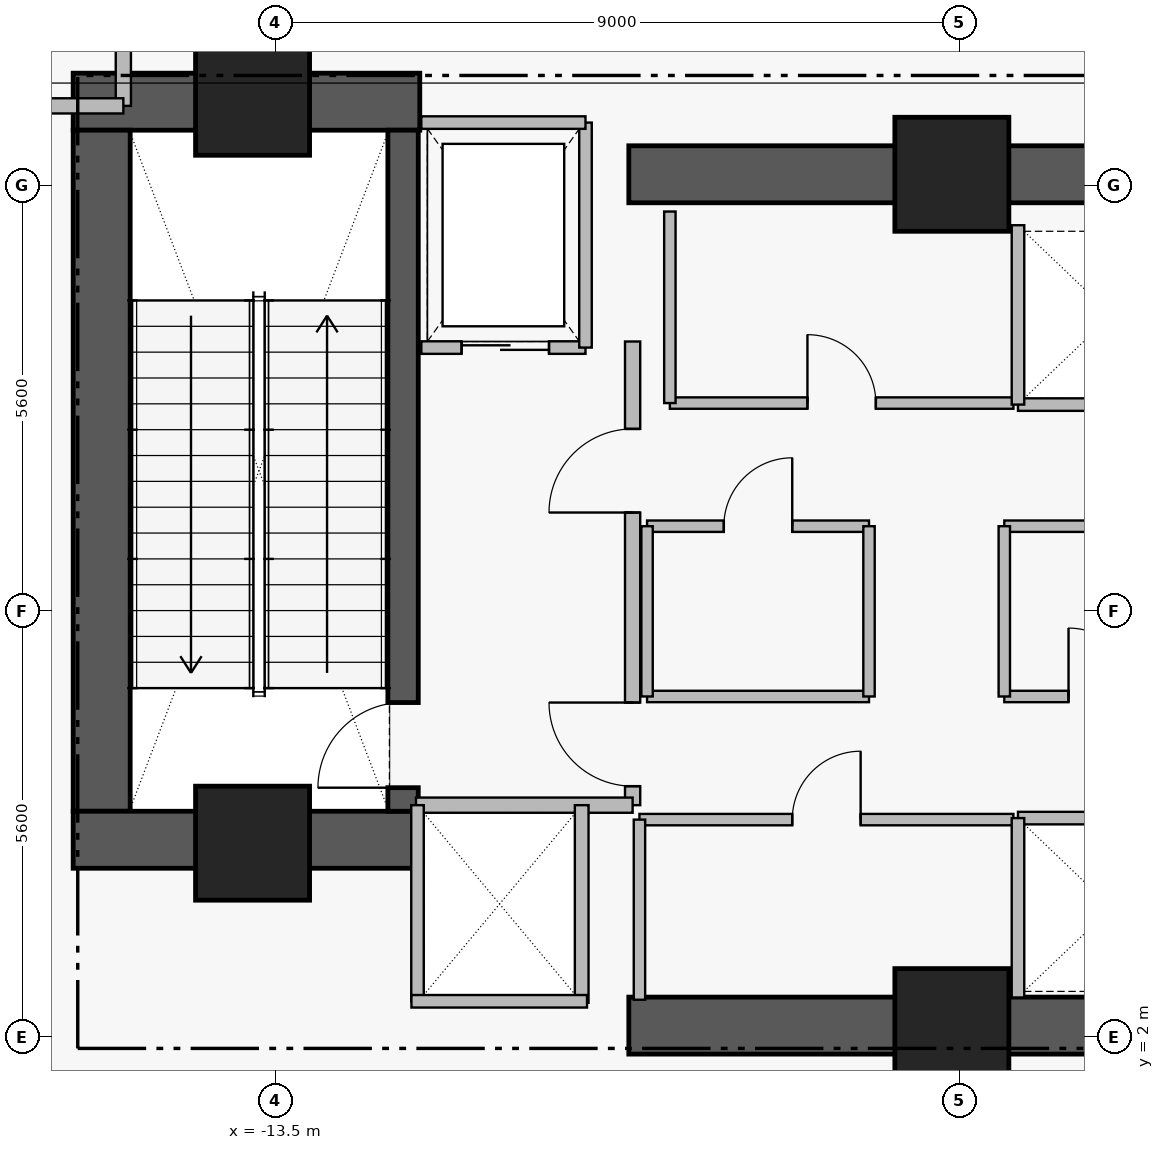
"""IFC4 building model, lengths in metres.
Left out: names, types, materials, properties, quantities, classifications, styles, units other than length and angle.
Written with IfcOpenShell. Run it as: python <this file> out.ifc"""

import sys

from ifc_helpers import new_model, si_unit, direction, frame, frame_2d, origin, origin_2d, place, context, subcontext, project, spatial, rectangle, extrude, element, fill, save


model = new_model("IFC4")
c1 = context("Model", 3, precision=1e-05, world=origin(), true_north=direction((0.0, 1.0)))
c2 = subcontext(c1, "Body", "Model", "MODEL_VIEW")
j1 = project(units=[si_unit("LENGTHUNIT", "METRE"), si_unit("PLANEANGLEUNIT", "RADIAN")], contexts=[c1])
p1 = place(None, origin())
s1 = spatial("IfcSite", under=j1, at=p1, CompositionType="ELEMENT")
p2 = place(p1, origin())
s2 = spatial("IfcBuilding", under=s1, at=p2, CompositionType="ELEMENT")
p3 = place(p2, frame((0.0, 0.0, 162.2)))
s3 = spatial("IfcBuildingStorey", under=s2, at=p3, CompositionType="ELEMENT", Elevation=162.2)
p4 = place(p3, frame((-16.16, 14.305, 0.0), z_axis=(0.0, 0.0, 1.0), x_axis=(1.0, 0.0, 0.0)))
e1 = element("IfcWall", 1, at=p4, inside=s3, PredefinedType="SHEAR", context=c2, shape_type="SweptSolid", body=[
    extrude(rectangle(XDim=4.56, YDim=0.75, at=frame_2d((2.28, 0.0))), origin(), (0.0, 0.0, 1.0), 5.81),
])
p5 = place(p3, frame((-15.785, 4.97, 0.0), z_axis=(0.0, 0.0, 1.0), x_axis=(0.0, 1.0, 0.0)))
e2 = element("IfcWall", 2, at=p5, inside=s3, PredefinedType="SHEAR", context=c2, shape_type="SweptSolid", body=[
    extrude(rectangle(XDim=8.96, YDim=0.75, at=frame_2d((4.48, 0.0))), origin(), (0.0, 0.0, 1.0), 5.81),
])
p6 = place(p3, frame((-16.16, 4.595, 0.0), z_axis=(0.0, 0.0, 1.0), x_axis=(1.0, 0.0, 0.0)))
e3 = element("IfcWall", 3, at=p6, inside=s3, PredefinedType="SHEAR", context=c2, shape_type="SweptSolid", body=[
    extrude(rectangle(XDim=4.56, YDim=0.75, at=frame_2d((2.28, 0.0))), origin(), (0.0, 0.0, 1.0), 5.81),
])
for number, where, z_axis, x_axis in (
    (4, (-8.85, 2.15, 0.0), (0.0, 0.0, 1.0), (1.0, 0.0, 0.0)),
    (5, (-8.85, 13.35, 0.0), (0.0, 0.0, 1.0), (1.0, 0.0, 0.0)),
):
    element("IfcWall", number, at=place(p3, frame(where, z_axis=z_axis, x_axis=x_axis)), inside=s3, PredefinedType="SHEAR", context=c2, shape_type="SweptSolid", body=[
        extrude(rectangle(XDim=7.6, YDim=0.75, at=frame_2d((3.8, 0.0))), origin(), (0.0, 0.0, 1.0), 5.74),
    ])
p7 = place(p3, frame((-11.82, 4.97, 0.0), z_axis=(0.0, 0.0, 1.0), x_axis=(0.0, 1.0, 0.0)))
e6 = element("IfcWall", 6, at=p7, inside=s3, PredefinedType="SHEAR", context=c2, shape_type="SweptSolid", body=[
    extrude(rectangle(XDim=8.96, YDim=0.4, at=frame_2d((4.48, 0.0))), origin(), (0.0, 0.0, 1.0), 5.81),
])
p8 = place(p7, frame((0.31, 0.0, 0.0)))
e7 = element("IfcOpeningElement", 7, at=p8, cuts=e6, PredefinedType="OPENING", context=c2, shape_type="SweptSolid", body=[
    extrude(rectangle(XDim=1.12, YDim=2.22, at=frame_2d((0.56, 1.11))), frame((0.0, 0.21, 0.0), z_axis=(0.0, -1.0, 0.0), x_axis=(1.0, 0.0, 0.0)), (0.0, 0.0, 1.0), 0.42),
])
for number, where, z_axis, x_axis in (
    (8, (-13.8, 14.35, 0.0), (0.0, 0.0, 1.0), (1.0, 0.0, 0.0)),
    (9, (-4.6, 13.35, 0.0), (0.0, 0.0, 1.0), (1.0, 0.0, 0.0)),
    (10, (-13.8, 4.55, 0.0), (0.0, 0.0, 1.0), (1.0, 0.0, 0.0)),
    (11, (-4.6, 2.15, 0.0), (0.0, 0.0, 1.0), (1.0, 0.0, 0.0)),
):
    element("IfcColumn", number, at=place(p3, frame(where, z_axis=z_axis, x_axis=x_axis)), inside=s3, PredefinedType="COLUMN", context=c2, shape_type="SweptSolid", body=[
        extrude(rectangle(XDim=1.5, YDim=1.5, at=origin_2d()), origin(), (0.0, 0.0, 1.0), 6.0),
    ])
p9 = place(p3, frame((-8.8, 5.05, 0.0), z_axis=(0.0, 0.0, 1.0), x_axis=(0.0, 1.0, 0.0)))
e12 = element("IfcWall", 12, at=p9, inside=s3, PredefinedType="PARTITIONING", context=c2, shape_type="SweptSolid", body=[
    extrude(rectangle(XDim=6.1, YDim=0.2, at=frame_2d((3.05, 0.0))), origin(), (0.0, 0.0, 1.0), 5.74),
])
p10 = place(p9, frame((0.25, 0.0, 0.0)))
e13 = element("IfcOpeningElement", 13, at=p10, cuts=e12, PredefinedType="OPENING", context=c2, shape_type="SweptSolid", body=[
    extrude(rectangle(XDim=1.1, YDim=2.2, at=frame_2d((0.55, 1.1))), frame((0.0, 0.11, 0.0), z_axis=(0.0, -1.0, 0.0), x_axis=(1.0, 0.0, 0.0)), (0.0, 0.0, 1.0), 0.22),
])
p11 = place(p9, frame((3.85, 0.0, 0.0)))
e14 = element("IfcOpeningElement", 14, at=p11, cuts=e12, PredefinedType="OPENING", context=c2, shape_type="SweptSolid", body=[
    extrude(rectangle(XDim=1.1, YDim=2.2, at=frame_2d((0.55, 1.1))), frame((0.0, 0.11, 0.0), z_axis=(0.0, -1.0, 0.0), x_axis=(1.0, 0.0, 0.0)), (0.0, 0.0, 1.0), 0.22),
])
p12 = place(p3, frame((-11.58, 11.07, 0.0), z_axis=(0.0, 0.0, 1.0), x_axis=(1.0, 0.0, 0.0)))
e15 = element("IfcWall", 15, at=p12, inside=s3, PredefinedType="PARTITIONING", context=c2, shape_type="SweptSolid", body=[
    extrude(rectangle(XDim=2.16, YDim=0.165, at=frame_2d((1.08, 0.0))), origin(), (0.0, 0.0, 1.0), 5.74),
])
p13 = place(p12, frame((0.53, 0.0, 0.0)))
e16 = element("IfcOpeningElement", 16, at=p13, cuts=e15, PredefinedType="OPENING", context=c2, shape_type="SweptSolid", body=[
    extrude(rectangle(XDim=1.15, YDim=2.25, at=frame_2d((0.575, 1.125))), frame((0.0, 0.093, 0.0), z_axis=(0.0, -1.0, 0.0), x_axis=(1.0, 0.0, 0.0)), (0.0, 0.0, 1.0), 0.185),
])
p14 = place(p3, frame((-8.71, 4.86, 0.0), z_axis=(0.0, 0.0, 1.0), x_axis=(1.0, 0.0, 0.0)))
e17 = element("IfcWall", 17, at=p14, inside=s3, PredefinedType="PARTITIONING", context=c2, shape_type="SweptSolid", body=[
    extrude(rectangle(XDim=4.92, YDim=0.15, at=frame_2d((2.46, 0.0))), origin(), (0.0, 0.0, 1.0), 5.74),
])
p15 = place(p14, frame((2.01, 0.0, 0.0)))
e18 = element("IfcOpeningElement", 18, at=p15, cuts=e17, PredefinedType="OPENING", context=c2, shape_type="SweptSolid", body=[
    extrude(rectangle(XDim=0.9, YDim=2.15, at=frame_2d((0.45, 1.075))), frame((0.0, 0.085, 0.0), z_axis=(0.0, -1.0, 0.0), x_axis=(1.0, 0.0, 0.0)), (0.0, 0.0, 1.0), 0.17),
])
p16 = place(p3, frame((-8.31, 10.34, 0.0), z_axis=(0.0, 0.0, 1.0), x_axis=(1.0, 0.0, 0.0)))
e19 = element("IfcWall", 19, at=p16, inside=s3, PredefinedType="PARTITIONING", context=c2, shape_type="SweptSolid", body=[
    extrude(rectangle(XDim=4.52, YDim=0.15, at=frame_2d((2.26, 0.0))), origin(), (0.0, 0.0, 1.0), 5.74),
])
p17 = place(p16, frame((1.81, 0.0, 0.0)))
e20 = element("IfcOpeningElement", 20, at=p17, cuts=e19, PredefinedType="OPENING", context=c2, shape_type="SweptSolid", body=[
    extrude(rectangle(XDim=0.9, YDim=2.15, at=frame_2d((0.45, 1.075))), frame((0.0, 0.085, 0.0), z_axis=(0.0, -1.0, 0.0), x_axis=(1.0, 0.0, 0.0)), (0.0, 0.0, 1.0), 0.17),
])
p18 = place(p3, frame((-8.61, 8.72, 0.0), z_axis=(0.0, 0.0, 1.0), x_axis=(1.0, 0.0, 0.0)))
e21 = element("IfcWall", 21, at=p18, inside=s3, PredefinedType="PARTITIONING", context=c2, shape_type="SweptSolid", body=[
    extrude(rectangle(XDim=2.92, YDim=0.15, at=frame_2d((1.46, 0.0))), origin(), (0.0, 0.0, 1.0), 5.74),
])
p19 = place(p18, frame((1.01, 0.0, 0.0)))
e22 = element("IfcOpeningElement", 22, at=p19, cuts=e21, PredefinedType="OPENING", context=c2, shape_type="SweptSolid", body=[
    extrude(rectangle(XDim=0.9, YDim=2.15, at=frame_2d((0.45, 1.075))), frame((0.0, 0.085, 0.0), z_axis=(0.0, -1.0, 0.0), x_axis=(1.0, 0.0, 0.0)), (0.0, 0.0, 1.0), 0.17),
])
p20 = place(p3, frame((-3.91, 6.48, 0.0), z_axis=(0.0, 0.0, 1.0), x_axis=(1.0, 0.0, 0.0)))
e23 = element("IfcWall", 23, at=p20, inside=s3, PredefinedType="PARTITIONING", context=c2, shape_type="SweptSolid", body=[
    extrude(rectangle(XDim=2.59, YDim=0.15, at=frame_2d((1.295, 0.0))), origin(), (0.0, 0.0, 1.0), 5.74),
])
p21 = place(p20, frame((0.845, 0.0, 0.0)))
e24 = element("IfcOpeningElement", 24, at=p21, cuts=e23, PredefinedType="OPENING", context=c2, shape_type="SweptSolid", body=[
    extrude(rectangle(XDim=0.9, YDim=2.15, at=frame_2d((0.45, 1.075))), frame((0.0, 0.085, 0.0), z_axis=(0.0, -1.0, 0.0), x_axis=(1.0, 0.0, 0.0)), (0.0, 0.0, 1.0), 0.17),
])
p22 = place(p3, frame((-15.5, 14.25, 0.0), z_axis=(0.0, 0.0, 1.0), x_axis=(0.0, 1.0, 0.0)))
e25 = element("IfcWall", 25, at=p22, inside=s3, PredefinedType="PARTITIONING", context=c2, shape_type="SweptSolid", body=[
    extrude(rectangle(XDim=5.05, YDim=0.2, at=frame_2d((2.525, 0.0))), origin(), (0.0, 0.0, 1.0), 5.74),
])
p23 = place(p22, frame((1.25, 0.0, 0.0)))
e26 = element("IfcOpeningElement", 26, at=p23, cuts=e25, PredefinedType="OPENING", context=c2, shape_type="SweptSolid", body=[
    extrude(rectangle(XDim=1.1, YDim=2.2, at=frame_2d((0.55, 1.1))), frame((0.0, 0.11, 0.0), z_axis=(0.0, -1.0, 0.0), x_axis=(1.0, 0.0, 0.0)), (0.0, 0.0, 1.0), 0.22),
])
p24 = place(p3, frame((-11.65, 5.05, 0.0), z_axis=(0.0, 0.0, 1.0), x_axis=(1.0, 0.0, 0.0)))
e27 = element("IfcWall", 27, at=p24, inside=s3, PredefinedType="PARTITIONING", context=c2, shape_type="SweptSolid", body=[
    extrude(rectangle(XDim=2.85, YDim=0.2, at=frame_2d((1.425, 0.0))), origin(), (0.0, 0.0, 1.0), 5.74),
])
p25 = place(p3, frame((-9.42, 11.07, 0.0), z_axis=(0.0, 0.0, 1.0), x_axis=(0.0, 1.0, 0.0)))
e28 = element("IfcWall", 28, at=p25, inside=s3, PredefinedType="PARTITIONING", context=c2, shape_type="SweptSolid", body=[
    extrude(rectangle(XDim=2.96, YDim=0.165, at=frame_2d((1.48, 0.0))), origin(), (0.0, 0.0, 1.0), 5.74),
])
p26 = place(p3, frame((-11.58, 14.03, 0.0), z_axis=(0.0, 0.0, 1.0), x_axis=(1.0, 0.0, 0.0)))
e29 = element("IfcWall", 29, at=p26, inside=s3, PredefinedType="PARTITIONING", context=c2, shape_type="SweptSolid", body=[
    extrude(rectangle(XDim=2.16, YDim=0.165, at=frame_2d((1.08, 0.0))), origin(), (0.0, 0.0, 1.0), 5.74),
])
p27 = place(p3, frame((-3.73, 4.88, 0.0), z_axis=(0.0, 0.0, 1.0), x_axis=(1.0, 0.0, 0.0)))
e30 = element("IfcWall", 30, at=p27, inside=s3, PredefinedType="PARTITIONING", context=c2, shape_type="SweptSolid", body=[
    extrude(rectangle(XDim=2.46, YDim=0.165, at=frame_2d((1.23, 0.0))), origin(), (0.0, 0.0, 1.0), 5.74),
])
p28 = place(p3, frame((-3.73, 2.52, 0.0), z_axis=(0.0, 0.0, 1.0), x_axis=(0.0, 1.0, 0.0)))
e31 = element("IfcWall", 31, at=p28, inside=s3, PredefinedType="PARTITIONING", context=c2, shape_type="SweptSolid", body=[
    extrude(rectangle(XDim=2.36, YDim=0.165, at=frame_2d((1.18, 0.0))), origin(), (0.0, 0.0, 1.0), 5.74),
])
p29 = place(p3, frame((-3.73, 10.32, 0.0), z_axis=(0.0, 0.0, 1.0), x_axis=(1.0, 0.0, 0.0)))
e32 = element("IfcWall", 32, at=p29, inside=s3, PredefinedType="PARTITIONING", context=c2, shape_type="SweptSolid", body=[
    extrude(rectangle(XDim=2.46, YDim=0.165, at=frame_2d((1.23, 0.0))), origin(), (0.0, 0.0, 1.0), 5.74),
])
p30 = place(p3, frame((-3.73, 10.32, 0.0), z_axis=(0.0, 0.0, 1.0), x_axis=(0.0, 1.0, 0.0)))
e33 = element("IfcWall", 33, at=p30, inside=s3, PredefinedType="PARTITIONING", context=c2, shape_type="SweptSolid", body=[
    extrude(rectangle(XDim=2.36, YDim=0.165, at=frame_2d((1.18, 0.0))), origin(), (0.0, 0.0, 1.0), 5.74),
])
p31 = place(p3, frame((-8.71, 2.49, 0.0), z_axis=(0.0, 0.0, 1.0), x_axis=(0.0, 1.0, 0.0)))
e34 = element("IfcWall", 34, at=p31, inside=s3, PredefinedType="PARTITIONING", context=c2, shape_type="SweptSolid", body=[
    extrude(rectangle(XDim=2.37, YDim=0.15, at=frame_2d((1.185, 0.0))), origin(), (0.0, 0.0, 1.0), 5.74),
])
p32 = place(p3, frame((-8.31, 10.34, 0.0), z_axis=(0.0, 0.0, 1.0), x_axis=(0.0, 1.0, 0.0)))
e35 = element("IfcWall", 35, at=p32, inside=s3, PredefinedType="PARTITIONING", context=c2, shape_type="SweptSolid", body=[
    extrude(rectangle(XDim=2.52, YDim=0.15, at=frame_2d((1.26, 0.0))), origin(), (0.0, 0.0, 1.0), 5.74),
])
p33 = place(p3, frame((-9.47, 2.45, 0.0), z_axis=(0.0, 0.0, 1.0), x_axis=(0.0, 1.0, 0.0)))
e36 = element("IfcWall", 36, at=p33, inside=s3, PredefinedType="PARTITIONING", context=c2, shape_type="SweptSolid", body=[
    extrude(rectangle(XDim=2.6, YDim=0.18, at=frame_2d((1.3, 0.0))), origin(), (0.0, 0.0, 1.0), 5.74),
])
p34 = place(p3, frame((-11.63, 2.47, 0.0), z_axis=(0.0, 0.0, 1.0), x_axis=(0.0, 1.0, 0.0)))
e37 = element("IfcWall", 37, at=p34, inside=s3, PredefinedType="PARTITIONING", context=c2, shape_type="SweptSolid", body=[
    extrude(rectangle(XDim=2.58, YDim=0.165, at=frame_2d((1.29, 0.0))), origin(), (0.0, 0.0, 1.0), 5.74),
])
p35 = place(p3, frame((-11.71, 2.47, 0.0), z_axis=(0.0, 0.0, 1.0), x_axis=(1.0, 0.0, 0.0)))
e38 = element("IfcWall", 38, at=p35, inside=s3, PredefinedType="PARTITIONING", context=c2, shape_type="SweptSolid", body=[
    extrude(rectangle(XDim=2.31, YDim=0.165, at=frame_2d((1.155, 0.0))), origin(), (0.0, 0.0, 1.0), 4.64),
])
p36 = place(p3, frame((-8.61, 6.48, 0.0), z_axis=(0.0, 0.0, 1.0), x_axis=(1.0, 0.0, 0.0)))
e39 = element("IfcWall", 39, at=p36, inside=s3, PredefinedType="PARTITIONING", context=c2, shape_type="SweptSolid", body=[
    extrude(rectangle(XDim=2.92, YDim=0.15, at=frame_2d((1.46, 0.0))), origin(), (0.0, 0.0, 1.0), 5.74),
])
for number, where, z_axis, x_axis in (
    (40, (-8.61, 6.48, 0.0), (0.0, 0.0, 1.0), (0.0, 1.0, 0.0)),
    (41, (-5.69, 6.48, 0.0), (0.0, 0.0, 1.0), (0.0, 1.0, 0.0)),
):
    element("IfcWall", number, at=place(p3, frame(where, z_axis=z_axis, x_axis=x_axis)), inside=s3, PredefinedType="PARTITIONING", context=c2, shape_type="SweptSolid", body=[
        extrude(rectangle(XDim=2.24, YDim=0.15, at=frame_2d((1.12, 0.0))), origin(), (0.0, 0.0, 1.0), 5.74),
    ])
p37 = place(p3, frame((-3.91, 8.72, 0.0), z_axis=(0.0, 0.0, 1.0), x_axis=(1.0, 0.0, 0.0)))
e42 = element("IfcWall", 42, at=p37, inside=s3, PredefinedType="PARTITIONING", context=c2, shape_type="SweptSolid", body=[
    extrude(rectangle(XDim=2.59, YDim=0.15, at=frame_2d((1.295, 0.0))), origin(), (0.0, 0.0, 1.0), 5.74),
])
p38 = place(p3, frame((-3.91, 6.48, 0.0), z_axis=(0.0, 0.0, 1.0), x_axis=(0.0, 1.0, 0.0)))
e43 = element("IfcWall", 43, at=p38, inside=s3, PredefinedType="PARTITIONING", context=c2, shape_type="SweptSolid", body=[
    extrude(rectangle(XDim=2.24, YDim=0.15, at=frame_2d((1.12, 0.0))), origin(), (0.0, 0.0, 1.0), 5.74),
])
p39 = place(p3, frame((-20.5, 14.25, 0.0), z_axis=(0.0, 0.0, 1.0), x_axis=(1.0, 0.0, 0.0)))
e44 = element("IfcWall", 44, at=p39, inside=s3, PredefinedType="PARTITIONING", context=c2, shape_type="SweptSolid", body=[
    extrude(rectangle(XDim=5.0, YDim=0.2, at=frame_2d((2.5, 0.0))), origin(), (0.0, 0.0, 1.0), 5.74),
])
p40 = place(p8, origin())
e45 = element("IfcDoor", 45, at=p40, inside=s3, OperationType="SINGLE_SWING_LEFT", PredefinedType="DOOR", context=c2, shape_type="SweptSolid", body=[
    extrude(rectangle(XDim=1.12, YDim=2.22, at=frame_2d((0.56, 1.11))), frame((0.0, 0.025, 0.0), z_axis=(0.0, -1.0, 0.0), x_axis=(1.0, 0.0, 0.0)), (0.0, 0.0, 1.0), 0.05),
])
fill(e7, e45)
p41 = place(p10, origin())
e46 = element("IfcDoor", 46, at=p41, inside=s3, OperationType="SINGLE_SWING_RIGHT", PredefinedType="DOOR", context=c2, shape_type="SweptSolid", body=[
    extrude(rectangle(XDim=1.1, YDim=2.2, at=frame_2d((0.55, 1.1))), frame((0.0, 0.025, 0.0), z_axis=(0.0, -1.0, 0.0), x_axis=(1.0, 0.0, 0.0)), (0.0, 0.0, 1.0), 0.05),
])
fill(e13, e46)
p42 = place(p11, origin())
e47 = element("IfcDoor", 47, at=p42, inside=s3, OperationType="SINGLE_SWING_LEFT", PredefinedType="DOOR", context=c2, shape_type="SweptSolid", body=[
    extrude(rectangle(XDim=1.1, YDim=2.2, at=frame_2d((0.55, 1.1))), frame((0.0, 0.025, 0.0), z_axis=(0.0, -1.0, 0.0), x_axis=(1.0, 0.0, 0.0)), (0.0, 0.0, 1.0), 0.05),
])
fill(e14, e47)
p43 = place(p13, origin())
e48 = element("IfcDoor", 48, at=p43, inside=s3, OperationType="SLIDING_TO_LEFT", PredefinedType="DOOR", context=c2, shape_type="SweptSolid", body=[
    extrude(rectangle(XDim=1.15, YDim=2.25, at=frame_2d((0.575, 1.125))), frame((0.0, 0.025, 0.0), z_axis=(0.0, -1.0, 0.0), x_axis=(1.0, 0.0, 0.0)), (0.0, 0.0, 1.0), 0.05),
])
fill(e16, e48)
p44 = place(p15, origin())
e49 = element("IfcDoor", 49, at=p44, inside=s3, OperationType="SINGLE_SWING_RIGHT", PredefinedType="DOOR", context=c2, shape_type="SweptSolid", body=[
    extrude(rectangle(XDim=0.9, YDim=2.15, at=frame_2d((0.45, 1.075))), frame((0.0, 0.025, 0.0), z_axis=(0.0, -1.0, 0.0), x_axis=(1.0, 0.0, 0.0)), (0.0, 0.0, 1.0), 0.05),
])
fill(e18, e49)
p45 = place(p17, origin())
e50 = element("IfcDoor", 50, at=p45, inside=s3, OperationType="SINGLE_SWING_LEFT", PredefinedType="DOOR", context=c2, shape_type="SweptSolid", body=[
    extrude(rectangle(XDim=0.9, YDim=2.15, at=frame_2d((0.45, 1.075))), frame((0.0, 0.025, 0.0), z_axis=(0.0, -1.0, 0.0), x_axis=(1.0, 0.0, 0.0)), (0.0, 0.0, 1.0), 0.05),
])
fill(e20, e50)
p46 = place(p19, origin())
e51 = element("IfcDoor", 51, at=p46, inside=s3, OperationType="SINGLE_SWING_RIGHT", PredefinedType="DOOR", context=c2, shape_type="SweptSolid", body=[
    extrude(rectangle(XDim=0.9, YDim=2.15, at=frame_2d((0.45, 1.075))), frame((0.0, 0.025, 0.0), z_axis=(0.0, -1.0, 0.0), x_axis=(1.0, 0.0, 0.0)), (0.0, 0.0, 1.0), 0.05),
])
fill(e22, e51)
p47 = place(p21, origin())
e52 = element("IfcDoor", 52, at=p47, inside=s3, OperationType="SINGLE_SWING_LEFT", PredefinedType="DOOR", context=c2, shape_type="SweptSolid", body=[
    extrude(rectangle(XDim=0.9, YDim=2.15, at=frame_2d((0.45, 1.075))), frame((0.0, 0.025, 0.0), z_axis=(0.0, -1.0, 0.0), x_axis=(1.0, 0.0, 0.0)), (0.0, 0.0, 1.0), 0.05),
])
fill(e24, e52)
save(model, sys.argv[1])
